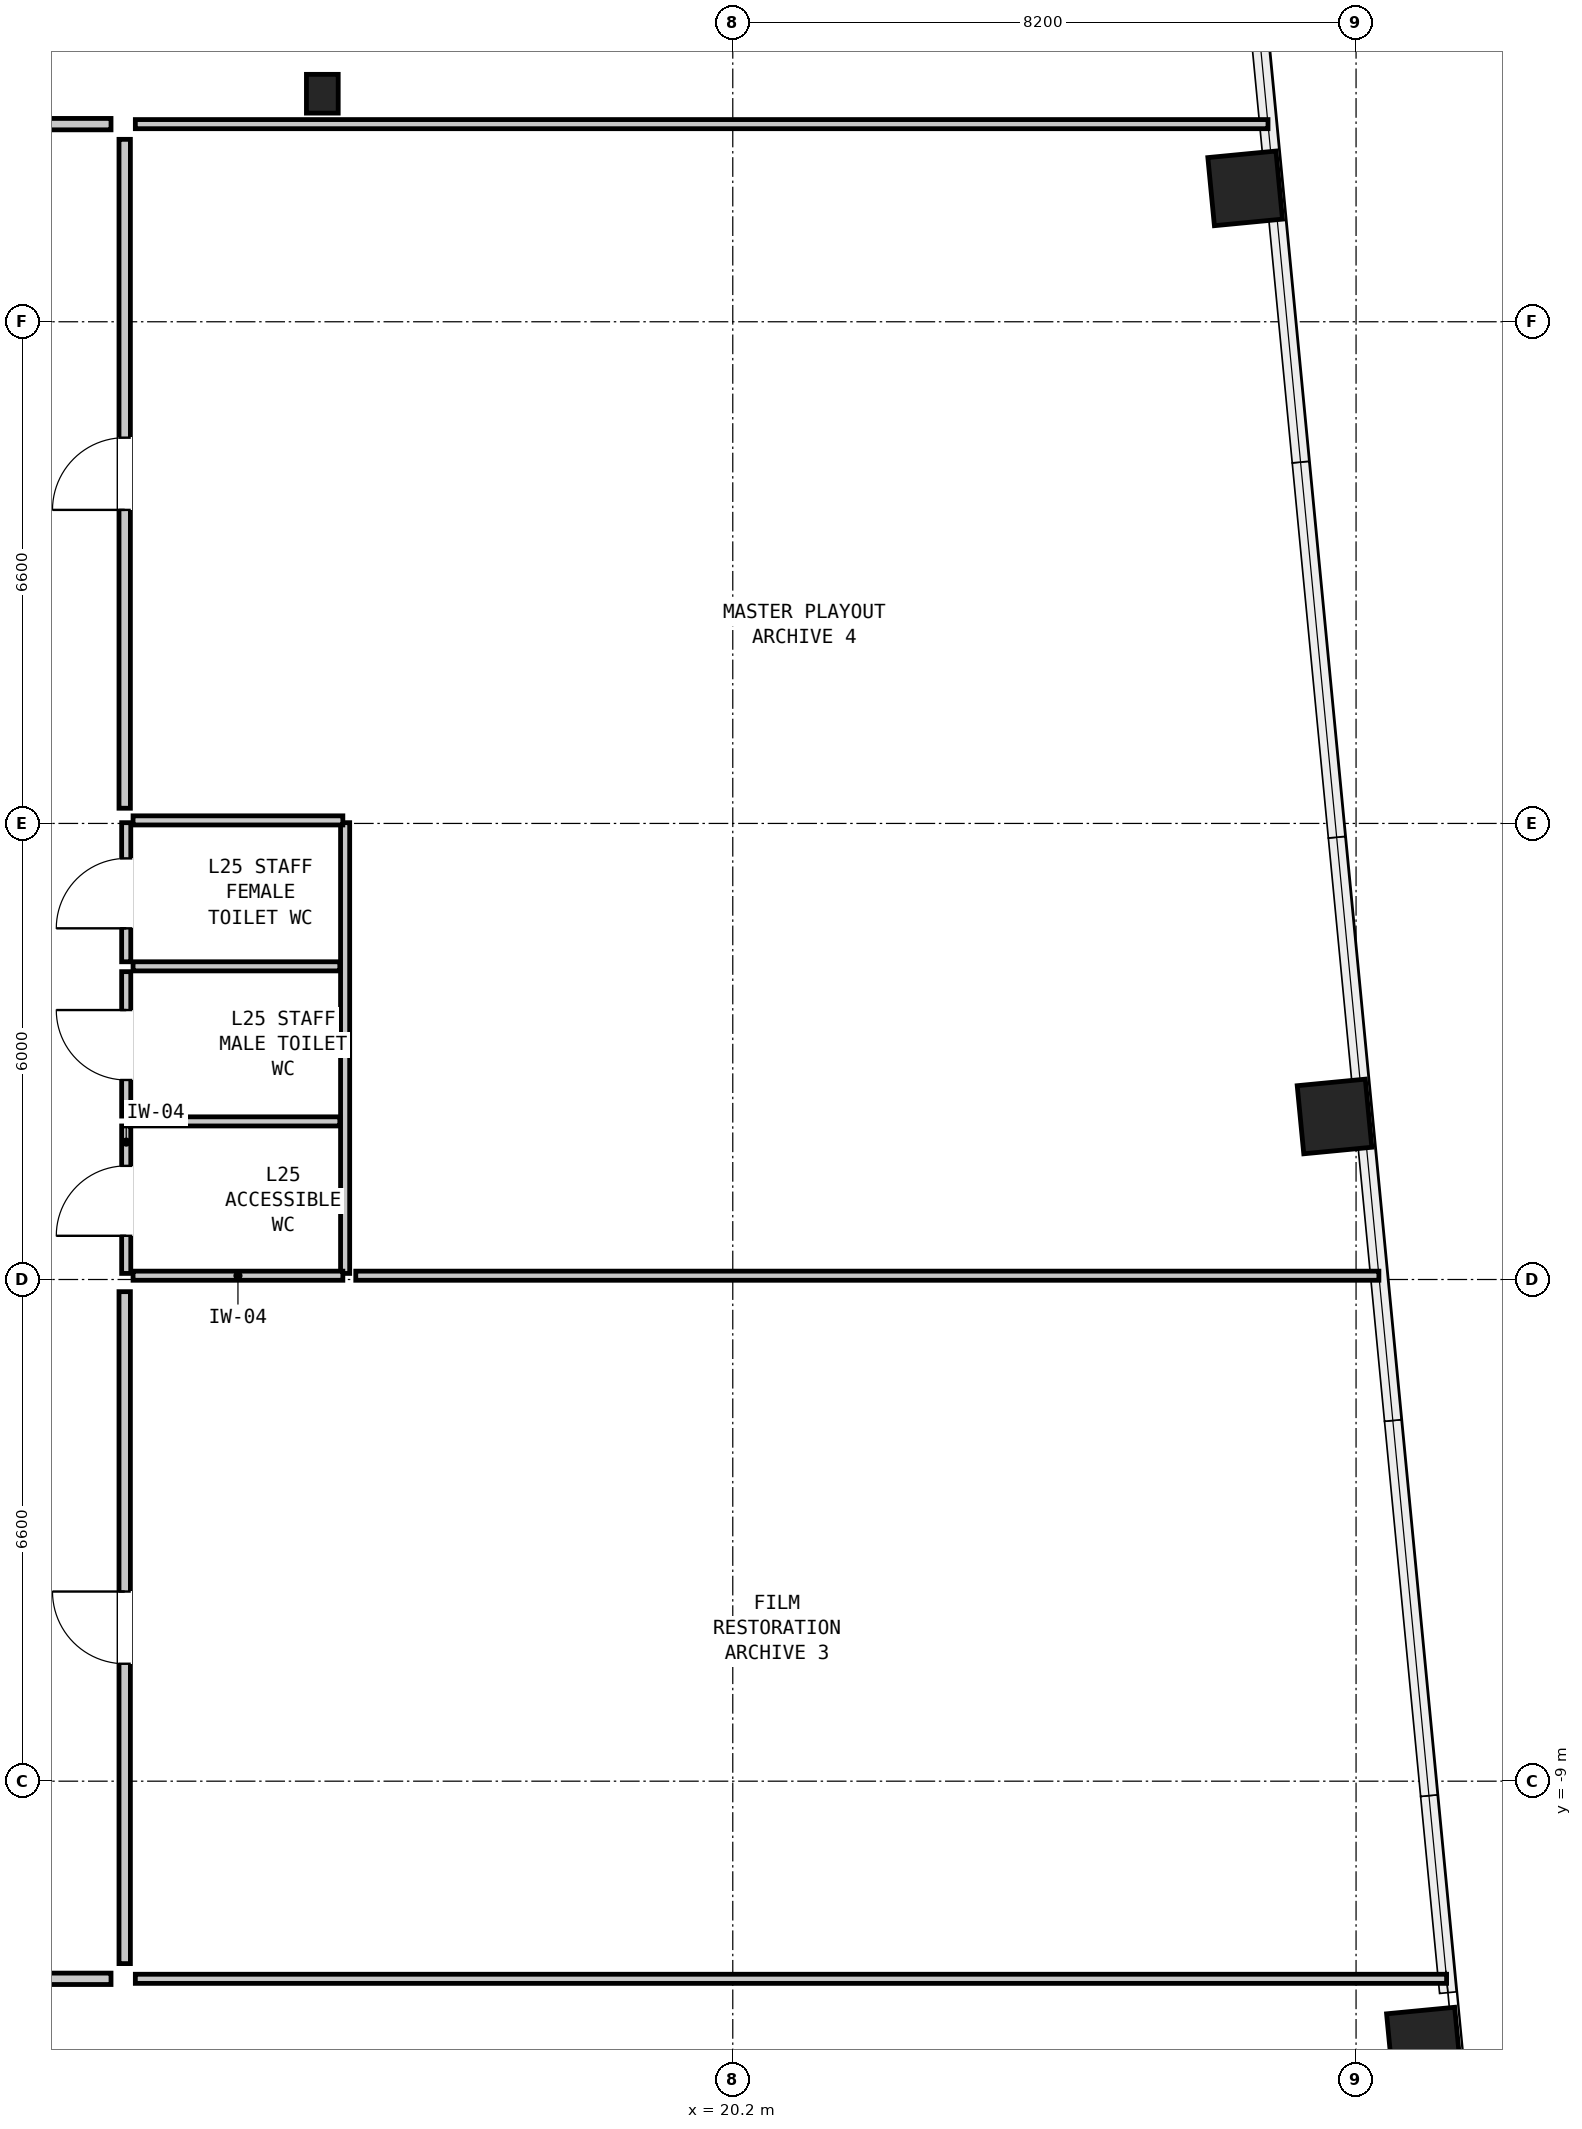
"""IFC4 building model, lengths in metres.
Left out: names, types, materials, properties, quantities, classifications, styles, units other than length and angle.
Written with IfcOpenShell. Run it as: python <this file> out.ifc"""

import sys

from ifc_helpers import new_model, si_unit, direction, frame, frame_2d, origin, origin_2d, place, context, subcontext, project, spatial, rectangle, hollow_rectangle, i_section, extrude, element, fill, save


model = new_model("IFC4")
c1 = context("Model", 3, precision=1e-05, world=origin(), true_north=direction((0.0, 1.0)))
c2 = subcontext(c1, "Body", "Model", "MODEL_VIEW")
j1 = project(units=[si_unit("LENGTHUNIT", "METRE"), si_unit("PLANEANGLEUNIT", "RADIAN")], contexts=[c1])
p1 = place(None, origin())
s1 = spatial("IfcSite", under=j1, at=p1, CompositionType="ELEMENT")
p2 = place(p1, origin())
s2 = spatial("IfcBuilding", under=s1, at=p2, CompositionType="ELEMENT")
p3 = place(p2, frame((0.0, 0.0, 87.75)))
s3 = spatial("IfcBuildingStorey", under=s2, at=p3, CompositionType="ELEMENT", Elevation=87.75)
for number, where, z_axis, x_axis in (
    (1, (29.292, -12.465, 0.0), (0.0, 0.0, 1.0), (-0.096, 0.995, 0.0)),
    (2, (28.117, -0.255, 0.0), (0.0, 0.0, 1.0), (-0.096, 0.995, 0.0)),
    (3, (26.941, 11.955, 0.0), (0.0, 0.0, 1.0), (-0.096, 0.995, 0.0)),
):
    element("IfcColumn", number, at=place(p3, frame(where, z_axis=z_axis, x_axis=x_axis)), inside=s3, PredefinedType="COLUMN", context=c2, shape_type="SweptSolid", body=[
        extrude(hollow_rectangle(XDim=0.9, YDim=0.9, WallThickness=0.055, at=origin_2d()), origin(), (0.0, 0.0, 1.0), 3.05),
    ])
p4 = place(p3, frame((14.8, 13.2, 0.0), z_axis=(0.0, 0.0, 1.0), x_axis=(1.0, 0.0, 0.0)))
e4 = element("IfcColumn", 4, at=p4, inside=s3, PredefinedType="COLUMN", context=c2, shape_type="SweptSolid", body=[
    extrude(i_section(OverallWidth=0.418, OverallDepth=0.51, WebThickness=0.042, FlangeThickness=0.068, at=origin_2d()), origin(), (0.0, 0.0, 1.0), 3.05),
])
p5 = place(p3, frame((12.22, -2.32, 0.0), z_axis=(0.0, 0.0, 1.0), x_axis=(0.0, 1.0, 0.0)))
e5 = element("IfcWall", 5, at=p5, inside=s3, PredefinedType="PARTITIONING", context=c2, shape_type="SweptSolid", body=[
    extrude(rectangle(XDim=1.94, YDim=0.12, at=frame_2d((0.97, 0.0))), origin(), (0.0, 0.0, 1.0), 2.83),
])
p6 = place(p5, frame((0.495, 0.0, 0.0)))
e6 = element("IfcOpeningElement", 6, at=p6, cuts=e5, PredefinedType="OPENING", context=c2, shape_type="SweptSolid", body=[
    extrude(rectangle(XDim=0.92, YDim=2.1, at=frame_2d((0.46, 1.05))), frame((0.0, 0.072, 0.0), z_axis=(0.0, -1.0, 0.0), x_axis=(1.0, 0.0, 0.0)), (0.0, 0.0, 1.0), 0.144),
])
p7 = place(p3, frame((12.22, -0.25, 0.0), z_axis=(0.0, 0.0, 1.0), x_axis=(0.0, 1.0, 0.0)))
e7 = element("IfcWall", 7, at=p7, inside=s3, PredefinedType="PARTITIONING", context=c2, shape_type="SweptSolid", body=[
    extrude(rectangle(XDim=1.9, YDim=0.12, at=frame_2d((0.95, 0.0))), origin(), (0.0, 0.0, 1.0), 2.83),
])
p8 = place(p7, frame((0.475, 0.0, 0.0)))
e8 = element("IfcOpeningElement", 8, at=p8, cuts=e7, PredefinedType="OPENING", context=c2, shape_type="SweptSolid", body=[
    extrude(rectangle(XDim=0.92, YDim=2.1, at=frame_2d((0.46, 1.05))), frame((0.0, 0.072, 0.0), z_axis=(0.0, -1.0, 0.0), x_axis=(1.0, 0.0, 0.0)), (0.0, 0.0, 1.0), 0.144),
])
p9 = place(p3, frame((12.22, 1.78, 0.0), z_axis=(0.0, 0.0, 1.0), x_axis=(0.0, 1.0, 0.0)))
e9 = element("IfcWall", 9, at=p9, inside=s3, PredefinedType="PARTITIONING", context=c2, shape_type="SweptSolid", body=[
    extrude(rectangle(XDim=1.83, YDim=0.12, at=frame_2d((0.915, 0.0))), origin(), (0.0, 0.0, 1.0), 2.83),
])
p10 = place(p9, frame((0.44, 0.0, 0.0)))
e10 = element("IfcOpeningElement", 10, at=p10, cuts=e9, PredefinedType="OPENING", context=c2, shape_type="SweptSolid", body=[
    extrude(rectangle(XDim=0.92, YDim=2.1, at=frame_2d((0.46, 1.05))), frame((0.0, 0.072, 0.0), z_axis=(0.0, -1.0, 0.0), x_axis=(1.0, 0.0, 0.0)), (0.0, 0.0, 1.0), 0.144),
])
p11 = place(p3, frame((15.1, -2.32, 0.0), z_axis=(0.0, 0.0, 1.0), x_axis=(0.0, 1.0, 0.0)))
e11 = element("IfcWall", 11, at=p11, inside=s3, PredefinedType="PARTITIONING", context=c2, shape_type="SweptSolid", body=[
    extrude(rectangle(XDim=5.93, YDim=0.12, at=frame_2d((2.965, 0.0))), origin(), (0.0, 0.0, 1.0), 2.83),
])
for number, where, z_axis, x_axis in (
    (12, (12.31, -2.35, 0.0), (0.0, 0.0, 1.0), (1.0, 0.0, 0.0)),
    (13, (12.31, 3.64, 0.0), (0.0, 0.0, 1.0), (1.0, 0.0, 0.0)),
):
    element("IfcWall", number, at=place(p3, frame(where, z_axis=z_axis, x_axis=x_axis)), inside=s3, PredefinedType="PARTITIONING", context=c2, shape_type="SweptSolid", body=[
        extrude(rectangle(XDim=2.76, YDim=0.12, at=frame_2d((1.38, 0.0))), origin(), (0.0, 0.0, 1.0), 1.799),
    ])
for number, where, z_axis, x_axis in (
    (14, (12.31, -0.32, 0.0), (0.0, 0.0, 1.0), (1.0, 0.0, 0.0)),
    (15, (12.31, 1.72, 0.0), (0.0, 0.0, 1.0), (1.0, 0.0, 0.0)),
):
    element("IfcWall", number, at=place(p3, frame(where, z_axis=z_axis, x_axis=x_axis)), inside=s3, PredefinedType="PARTITIONING", context=c2, shape_type="SweptSolid", body=[
        extrude(rectangle(XDim=2.72, YDim=0.12, at=frame_2d((1.36, 0.0))), origin(), (0.0, 0.0, 1.0), 2.83),
    ])
p12 = place(p3, frame((12.34, 12.8, 0.0), z_axis=(0.0, 0.0, 1.0), x_axis=(1.0, 0.0, 0.0)))
e16 = element("IfcWall", 16, at=p12, inside=s3, PredefinedType="PARTITIONING", context=c2, shape_type="SweptSolid", body=[
    extrude(rectangle(XDim=14.902, YDim=0.12, at=frame_2d((7.451, 0.0))), origin(), (0.0, 0.0, 1.0), 2.83),
])
p13 = place(p3, frame((12.34, -11.6, 0.0), z_axis=(0.0, 0.0, 1.0), x_axis=(1.0, 0.0, 0.0)))
e17 = element("IfcWall", 17, at=p13, inside=s3, PredefinedType="PARTITIONING", context=c2, shape_type="SweptSolid", body=[
    extrude(rectangle(XDim=17.251, YDim=0.12, at=frame_2d((8.625, 0.0))), origin(), (0.0, 0.0, 1.0), 2.274),
])
p14 = place(p3, frame((15.24, -2.35, 0.0), z_axis=(0.0, 0.0, 1.0), x_axis=(1.0, 0.0, 0.0)))
e18 = element("IfcWall", 18, at=p14, inside=s3, PredefinedType="PARTITIONING", context=c2, shape_type="SweptSolid", body=[
    extrude(rectangle(XDim=13.46, YDim=0.12, at=frame_2d((6.73, 0.0))), origin(), (0.0, 0.0, 1.0), 1.799),
])
p15 = place(p3, frame((6.68, 12.8, 0.0), z_axis=(0.0, 0.0, 1.0), x_axis=(1.0, 0.0, 0.0)))
e19 = element("IfcWall", 19, at=p15, inside=s3, PredefinedType="PARTITIONING", context=c2, shape_type="SweptSolid", body=[
    extrude(rectangle(XDim=5.34, YDim=0.15, at=frame_2d((2.67, 0.0))), origin(), (0.0, 0.0, 1.0), 2.83),
])
p16 = place(p15, frame((1.395, 0.0, 0.0)))
e20 = element("IfcOpeningElement", 20, at=p16, cuts=e19, PredefinedType="OPENING", context=c2, shape_type="SweptSolid", body=[
    extrude(rectangle(XDim=0.95, YDim=2.1, at=frame_2d((0.475, 1.05))), frame((0.0, 0.087, 0.0), z_axis=(0.0, -1.0, 0.0), x_axis=(1.0, 0.0, 0.0)), (0.0, 0.0, 1.0), 0.174),
])
p17 = place(p3, frame((7.68, -11.6, 0.0), z_axis=(0.0, 0.0, 1.0), x_axis=(1.0, 0.0, 0.0)))
e21 = element("IfcWall", 21, at=p17, inside=s3, PredefinedType="PARTITIONING", context=c2, shape_type="SweptSolid", body=[
    extrude(rectangle(XDim=4.34, YDim=0.15, at=frame_2d((2.17, 0.0))), origin(), (0.0, 0.0, 1.0), 2.274),
])
p18 = place(p17, frame((2.095, 0.0, 0.0)))
e22 = element("IfcOpeningElement", 22, at=p18, cuts=e21, PredefinedType="OPENING", context=c2, shape_type="SweptSolid", body=[
    extrude(rectangle(XDim=0.95, YDim=2.1, at=frame_2d((0.475, 1.05))), frame((0.0, 0.087, 0.0), z_axis=(0.0, -1.0, 0.0), x_axis=(1.0, 0.0, 0.0)), (0.0, 0.0, 1.0), 0.174),
])
p19 = place(p3, frame((12.2, -11.4, 0.0), z_axis=(0.0, 0.0, 1.0), x_axis=(0.0, 1.0, 0.0)))
e23 = element("IfcWall", 23, at=p19, inside=s3, PredefinedType="PARTITIONING", context=c2, shape_type="SweptSolid", body=[
    extrude(rectangle(XDim=8.84, YDim=0.15, at=frame_2d((4.42, 0.0))), origin(), (0.0, 0.0, 1.0), 2.83),
])
p20 = place(p19, frame((3.945, 0.0, 0.0)))
e24 = element("IfcOpeningElement", 24, at=p20, cuts=e23, PredefinedType="OPENING", context=c2, shape_type="SweptSolid", body=[
    extrude(rectangle(XDim=0.95, YDim=2.1, at=frame_2d((0.475, 1.05))), frame((0.0, 0.087, 0.0), z_axis=(0.0, -1.0, 0.0), x_axis=(1.0, 0.0, 0.0)), (0.0, 0.0, 1.0), 0.174),
])
p21 = place(p3, frame((12.2, 3.8, 0.0), z_axis=(0.0, 0.0, 1.0), x_axis=(0.0, 1.0, 0.0)))
e25 = element("IfcWall", 25, at=p21, inside=s3, PredefinedType="PARTITIONING", context=c2, shape_type="SweptSolid", body=[
    extrude(rectangle(XDim=8.8, YDim=0.15, at=frame_2d((4.4, 0.0))), origin(), (0.0, 0.0, 1.0), 2.83),
])
p22 = place(p21, frame((3.925, 0.0, 0.0)))
e26 = element("IfcOpeningElement", 26, at=p22, cuts=e25, PredefinedType="OPENING", context=c2, shape_type="SweptSolid", body=[
    extrude(rectangle(XDim=0.95, YDim=2.1, at=frame_2d((0.475, 1.05))), frame((0.0, 0.087, 0.0), z_axis=(0.0, -1.0, 0.0), x_axis=(1.0, 0.0, 0.0)), (0.0, 0.0, 1.0), 0.174),
])
p23 = place(p6, origin())
e27 = element("IfcDoor", 27, at=p23, inside=s3, OperationType="SINGLE_SWING_LEFT", PredefinedType="DOOR", context=c2, shape_type="SweptSolid", body=[
    extrude(rectangle(XDim=0.92, YDim=2.1, at=frame_2d((0.46, 1.05))), frame((0.0, 0.025, 0.0), z_axis=(0.0, -1.0, 0.0), x_axis=(1.0, 0.0, 0.0)), (0.0, 0.0, 1.0), 0.05),
])
fill(e6, e27)
p24 = place(p8, origin())
e28 = element("IfcDoor", 28, at=p24, inside=s3, OperationType="SINGLE_SWING_RIGHT", PredefinedType="DOOR", context=c2, shape_type="SweptSolid", body=[
    extrude(rectangle(XDim=0.92, YDim=2.1, at=frame_2d((0.46, 1.05))), frame((0.0, 0.025, 0.0), z_axis=(0.0, -1.0, 0.0), x_axis=(1.0, 0.0, 0.0)), (0.0, 0.0, 1.0), 0.05),
])
fill(e8, e28)
p25 = place(p10, origin())
e29 = element("IfcDoor", 29, at=p25, inside=s3, OperationType="SINGLE_SWING_LEFT", PredefinedType="DOOR", context=c2, shape_type="SweptSolid", body=[
    extrude(rectangle(XDim=0.92, YDim=2.1, at=frame_2d((0.46, 1.05))), frame((0.0, 0.025, 0.0), z_axis=(0.0, -1.0, 0.0), x_axis=(1.0, 0.0, 0.0)), (0.0, 0.0, 1.0), 0.05),
])
fill(e10, e29)
p26 = place(p20, origin())
e30 = element("IfcDoor", 30, at=p26, inside=s3, OperationType="SINGLE_SWING_RIGHT", PredefinedType="DOOR", context=c2, shape_type="SweptSolid", body=[
    extrude(rectangle(XDim=0.95, YDim=2.1, at=frame_2d((0.475, 1.05))), frame((0.0, 0.025, 0.0), z_axis=(0.0, -1.0, 0.0), x_axis=(1.0, 0.0, 0.0)), (0.0, 0.0, 1.0), 0.05),
])
fill(e24, e30)
p27 = place(p22, origin())
e31 = element("IfcDoor", 31, at=p27, inside=s3, OperationType="SINGLE_SWING_LEFT", PredefinedType="DOOR", context=c2, shape_type="SweptSolid", body=[
    extrude(rectangle(XDim=0.95, YDim=2.1, at=frame_2d((0.475, 1.05))), frame((0.0, 0.025, 0.0), z_axis=(0.0, -1.0, 0.0), x_axis=(1.0, 0.0, 0.0)), (0.0, 0.0, 1.0), 0.05),
])
fill(e26, e31)
save(model, sys.argv[1])
